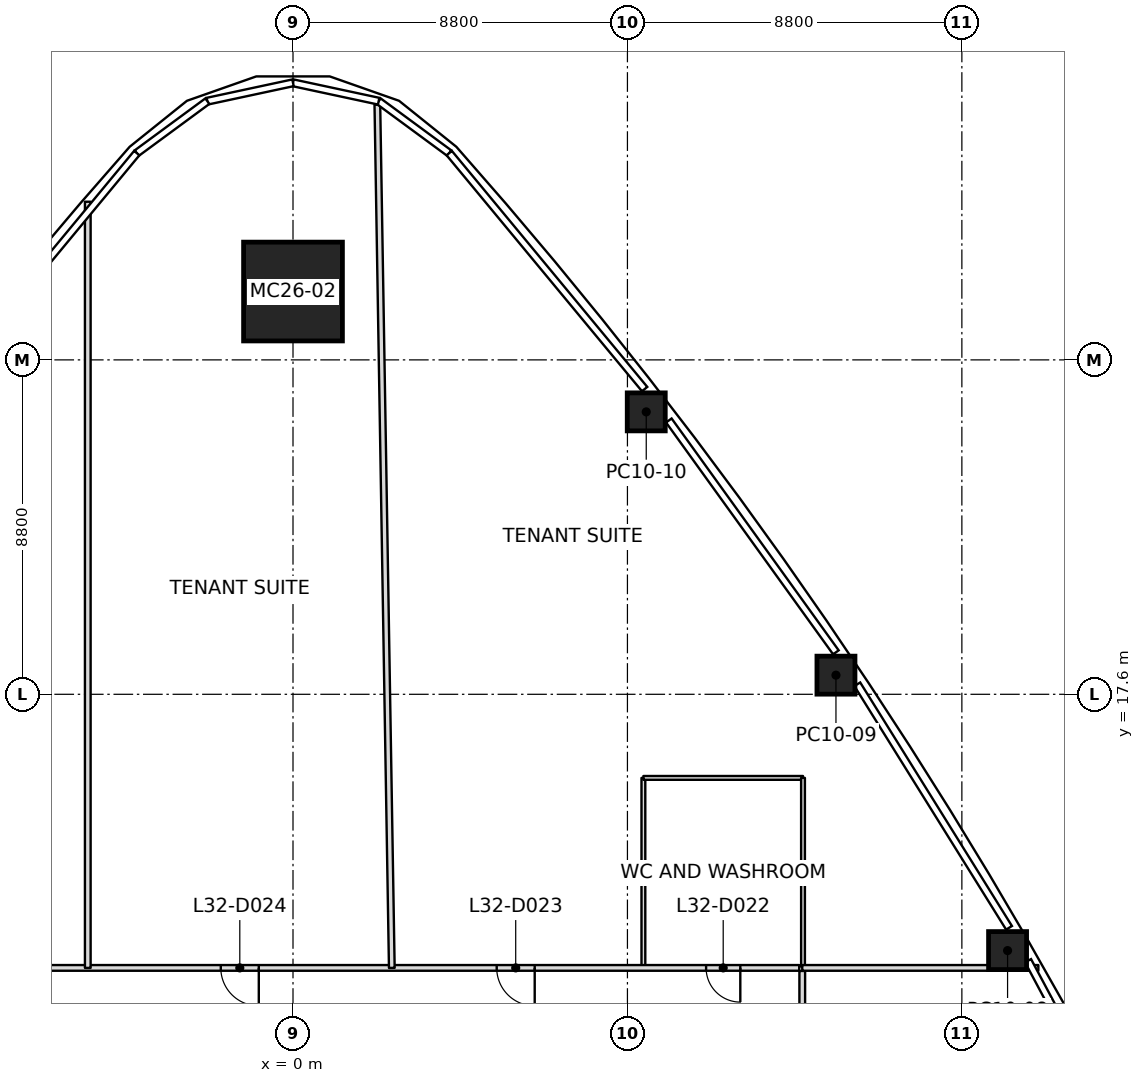
"""IFC4 building model, lengths in metres.
Left out: names, types, materials, properties, quantities, classifications, styles, units other than length and angle.
Written with IfcOpenShell. Run it as: python <this file> out.ifc"""

import sys

from ifc_helpers import new_model, si_unit, direction, frame, frame_2d, origin, origin_2d, place, context, subcontext, project, spatial, rectangle, extrude, element, fill, save


model = new_model("IFC4")
c1 = context("Model", 3, precision=1e-05, world=origin(), true_north=direction((0.0, 1.0)))
c2 = subcontext(c1, "Body", "Model", "MODEL_VIEW")
j1 = project(units=[si_unit("LENGTHUNIT", "METRE"), si_unit("PLANEANGLEUNIT", "RADIAN")], contexts=[c1])
p1 = place(None, origin())
s1 = spatial("IfcSite", under=j1, at=p1, CompositionType="ELEMENT")
p2 = place(p1, origin())
s2 = spatial("IfcBuilding", under=s1, at=p2, CompositionType="ELEMENT")
p3 = place(p2, frame((0.0, 0.0, 149.8)))
s3 = spatial("IfcBuildingStorey", under=s2, at=p3, CompositionType="ELEMENT", Elevation=149.8)
p4 = place(p3, frame((0.0, 28.199, 0.0), z_axis=(0.0, -0.032392660026, 0.999475220091), x_axis=(1.0, 0.0, 0.0)))
e1 = element("IfcColumn", 1, at=p4, inside=s3, PredefinedType="COLUMN", context=c2, shape_type="SweptSolid", body=[
    extrude(rectangle(XDim=2.6, YDim=2.6, at=origin_2d()), origin(), (0.0, 0.0, 1.0), 4.002),
])
p5 = place(p3, frame((18.802, 10.856, 0.0), z_axis=(-0.009826027463, -0.005675904062, 0.999935614576), x_axis=(-0.499975861713, 0.866039339578, 2.779837e-06)))
e2 = element("IfcColumn", 2, at=p5, inside=s3, PredefinedType="COLUMN", context=c2, shape_type="SweptSolid", body=[
    extrude(rectangle(XDim=1.0, YDim=1.0, at=origin_2d()), origin(), (0.0, 0.0, 1.0), 4.0),
])
p6 = place(p3, frame((14.287, 18.104, 0.0), z_axis=(-0.005248490815, -0.013243284963, 0.999898529226), x_axis=(-0.556999856926, 0.830473325265, 0.008075605706)))
e3 = element("IfcColumn", 3, at=p6, inside=s3, PredefinedType="COLUMN", context=c2, shape_type="SweptSolid", body=[
    extrude(rectangle(XDim=1.0, YDim=1.0, at=origin_2d()), origin(), (0.0, 0.0, 1.0), 4.0),
])
p7 = place(p3, frame((9.295, 25.032, 0.0), z_axis=(-0.000244088989, -0.020564497316, 0.999788498569), x_axis=(-0.611500783667, 0.791079555374, 0.016122302675)))
e4 = element("IfcColumn", 4, at=p7, inside=s3, PredefinedType="COLUMN", context=c2, shape_type="SweptSolid", body=[
    extrude(rectangle(XDim=1.0, YDim=1.0, at=origin_2d()), origin(), (0.0, 0.0, 1.0), 4.001),
])
p8 = place(p3, frame((-5.4, 10.4, 0.0), z_axis=(0.0, 0.0, 1.0), x_axis=(0.0, 1.0, 0.0)))
e5 = element("IfcWall", 5, at=p8, inside=s3, PredefinedType="PARTITIONING", context=c2, shape_type="SweptSolid", body=[
    extrude(rectangle(XDim=20.162, YDim=0.15, at=frame_2d((10.081, 0.0))), origin(), (0.0, 0.0, 1.0), 3.234),
])
p9 = place(p3, frame((2.6, 10.4, 0.0), z_axis=(0.0, 0.0, 1.0), x_axis=(-0.01674277869, 0.999859829857, 0.0)))
e6 = element("IfcWall", 6, at=p9, inside=s3, PredefinedType="PARTITIONING", context=c2, shape_type="SweptSolid", body=[
    extrude(rectangle(XDim=22.719, YDim=0.15, at=frame_2d((11.359, 0.0))), origin(), (0.0, 0.0, 1.0), 3.234),
])
p10 = place(p3, frame((13.4, 10.4, 0.0), z_axis=(0.0, 0.0, 1.0), x_axis=(1.0, 0.0, 0.0)))
e7 = element("IfcWall", 7, at=p10, inside=s3, PredefinedType="PARTITIONING", context=c2, shape_type="SweptSolid", body=[
    extrude(rectangle(XDim=6.213, YDim=0.15, at=frame_2d((3.106, 0.0))), origin(), (0.0, 0.0, 1.0), 3.234),
])
p11 = place(p3, frame((13.32, 10.4, 0.0), z_axis=(0.0, 0.0, 1.0), x_axis=(-1.0, 0.0, 0.0)))
e8 = element("IfcWall", 8, at=p11, inside=s3, PredefinedType="PARTITIONING", context=c2, shape_type="SweptSolid", body=[
    extrude(rectangle(XDim=26.64, YDim=0.15, at=frame_2d((13.32, 0.0))), origin(), (0.0, 0.0, 1.0), 3.166),
])
p12 = place(p11, frame((1.55, 0.0, 0.0)))
e9 = element("IfcOpeningElement", 9, at=p12, cuts=e8, PredefinedType="OPENING", context=c2, shape_type="SweptSolid", body=[
    extrude(rectangle(XDim=0.9, YDim=2.1, at=frame_2d((0.45, 1.05))), frame((0.0, 0.075, 0.0), z_axis=(0.0, -1.0, 0.0), x_axis=(1.0, 0.0, 0.0)), (0.0, 0.0, 1.0), 0.15),
])
p13 = place(p11, frame((6.96, 0.0, 0.0)))
e10 = element("IfcOpeningElement", 10, at=p13, cuts=e8, PredefinedType="OPENING", context=c2, shape_type="SweptSolid", body=[
    extrude(rectangle(XDim=1.0, YDim=2.1, at=frame_2d((0.5, 1.05))), frame((0.0, 0.075, 0.0), z_axis=(0.0, -1.0, 0.0), x_axis=(1.0, 0.0, 0.0)), (0.0, 0.0, 1.0), 0.15),
])
p14 = place(p11, frame((14.22, 0.0, 0.0)))
e11 = element("IfcOpeningElement", 11, at=p14, cuts=e8, PredefinedType="OPENING", context=c2, shape_type="SweptSolid", body=[
    extrude(rectangle(XDim=1.0, YDim=2.1, at=frame_2d((0.5, 1.05))), frame((0.0, 0.075, 0.0), z_axis=(0.0, -1.0, 0.0), x_axis=(1.0, 0.0, 0.0)), (0.0, 0.0, 1.0), 0.15),
])
p15 = place(p11, frame((22.23, 0.0, 0.0)))
e12 = element("IfcOpeningElement", 12, at=p15, cuts=e8, PredefinedType="OPENING", context=c2, shape_type="SweptSolid", body=[
    extrude(rectangle(XDim=1.0, YDim=2.1, at=frame_2d((0.5, 1.05))), frame((0.0, 0.075, 0.0), z_axis=(0.0, -1.0, 0.0), x_axis=(1.0, 0.0, 0.0)), (0.0, 0.0, 1.0), 0.15),
])
p16 = place(p3, frame((13.4, -10.32, 0.0), z_axis=(0.0, 0.0, 1.0), x_axis=(0.0, 1.0, 0.0)))
e13 = element("IfcWall", 13, at=p16, inside=s3, PredefinedType="PARTITIONING", context=c2, shape_type="SweptSolid", body=[
    extrude(rectangle(XDim=20.64, YDim=0.15, at=frame_2d((10.32, 0.0))), origin(), (0.0, 0.0, 1.0), 3.166),
])
p17 = place(p16, frame((16.22, 0.0, 0.0)))
e14 = element("IfcOpeningElement", 14, at=p17, cuts=e13, PredefinedType="OPENING", context=c2, shape_type="SweptSolid", body=[
    extrude(rectangle(XDim=1.0, YDim=2.1, at=frame_2d((0.5, 1.05))), frame((0.0, 0.075, 0.0), z_axis=(0.0, -1.0, 0.0), x_axis=(1.0, 0.0, 0.0)), (0.0, 0.0, 1.0), 0.15),
])
p18 = place(p16, frame((0.95, 0.0, 0.0)))
e15 = element("IfcOpeningElement", 15, at=p18, cuts=e13, PredefinedType="OPENING", context=c2, shape_type="SweptSolid", body=[
    extrude(rectangle(XDim=0.9, YDim=2.1, at=frame_2d((0.45, 1.05))), frame((0.0, 0.075, 0.0), z_axis=(0.0, -1.0, 0.0), x_axis=(1.0, 0.0, 0.0)), (0.0, 0.0, 1.0), 0.15),
])
p19 = place(p16, frame((3.36, 0.0, 0.0)))
e16 = element("IfcOpeningElement", 16, at=p19, cuts=e13, PredefinedType="OPENING", context=c2, shape_type="SweptSolid", body=[
    extrude(rectangle(XDim=1.0, YDim=2.1, at=frame_2d((0.5, 1.05))), frame((0.0, 0.075, 0.0), z_axis=(0.0, -1.0, 0.0), x_axis=(1.0, 0.0, 0.0)), (0.0, 0.0, 1.0), 0.15),
])
p20 = place(p16, frame((8.22, 0.0, 0.0)))
e17 = element("IfcOpeningElement", 17, at=p20, cuts=e13, PredefinedType="OPENING", context=c2, shape_type="SweptSolid", body=[
    extrude(rectangle(XDim=1.0, YDim=2.1, at=frame_2d((0.5, 1.05))), frame((0.0, 0.075, 0.0), z_axis=(0.0, -1.0, 0.0), x_axis=(1.0, 0.0, 0.0)), (0.0, 0.0, 1.0), 0.15),
])
p21 = place(p3, frame((9.22, 10.43, 0.0), z_axis=(0.0, 0.0, 1.0), x_axis=(0.0, 1.0, 0.0)))
e18 = element("IfcWall", 18, at=p21, inside=s3, PredefinedType="PARTITIONING", context=c2, shape_type="SweptSolid", body=[
    extrude(rectangle(XDim=4.97, YDim=0.1, at=frame_2d((2.485, 0.0))), origin(), (0.0, 0.0, 1.0), 3.247),
])
p22 = place(p3, frame((9.22, 15.4, 0.0), z_axis=(0.0, 0.0, 1.0), x_axis=(1.0, 0.0, 0.0)))
e19 = element("IfcWall", 19, at=p22, inside=s3, PredefinedType="PARTITIONING", context=c2, shape_type="SweptSolid", body=[
    extrude(rectangle(XDim=4.2, YDim=0.1, at=frame_2d((2.1, 0.0))), origin(), (0.0, 0.0, 1.0), 3.45),
])
p23 = place(p3, frame((13.42, 15.4, 0.0), z_axis=(0.0, 0.0, 1.0), x_axis=(0.0, -1.0, 0.0)))
e20 = element("IfcWall", 20, at=p23, inside=s3, PredefinedType="PARTITIONING", context=c2, shape_type="SweptSolid", body=[
    extrude(rectangle(XDim=4.97, YDim=0.1, at=frame_2d((2.485, 0.0))), origin(), (0.0, 0.0, 1.0), 3.247),
])
p24 = place(p12, origin())
e21 = element("IfcDoor", 21, at=p24, inside=s3, OperationType="SINGLE_SWING_RIGHT", PredefinedType="DOOR", context=c2, shape_type="SweptSolid", body=[
    extrude(rectangle(XDim=0.9, YDim=2.1, at=frame_2d((0.45, 1.05))), frame((0.0, 0.025, 0.0), z_axis=(0.0, -1.0, 0.0), x_axis=(1.0, 0.0, 0.0)), (0.0, 0.0, 1.0), 0.05),
])
fill(e9, e21)
p25 = place(p13, origin())
e22 = element("IfcDoor", 22, at=p25, inside=s3, OperationType="SINGLE_SWING_RIGHT", PredefinedType="DOOR", context=c2, shape_type="SweptSolid", body=[
    extrude(rectangle(XDim=1.0, YDim=2.1, at=frame_2d((0.5, 1.05))), frame((0.0, 0.025, 0.0), z_axis=(0.0, -1.0, 0.0), x_axis=(1.0, 0.0, 0.0)), (0.0, 0.0, 1.0), 0.05),
])
fill(e10, e22)
p26 = place(p14, origin())
e23 = element("IfcDoor", 23, at=p26, inside=s3, OperationType="SINGLE_SWING_LEFT", PredefinedType="DOOR", context=c2, shape_type="SweptSolid", body=[
    extrude(rectangle(XDim=1.0, YDim=2.1, at=frame_2d((0.5, 1.05))), frame((0.0, 0.025, 0.0), z_axis=(0.0, -1.0, 0.0), x_axis=(1.0, 0.0, 0.0)), (0.0, 0.0, 1.0), 0.05),
])
fill(e11, e23)
save(model, sys.argv[1])
